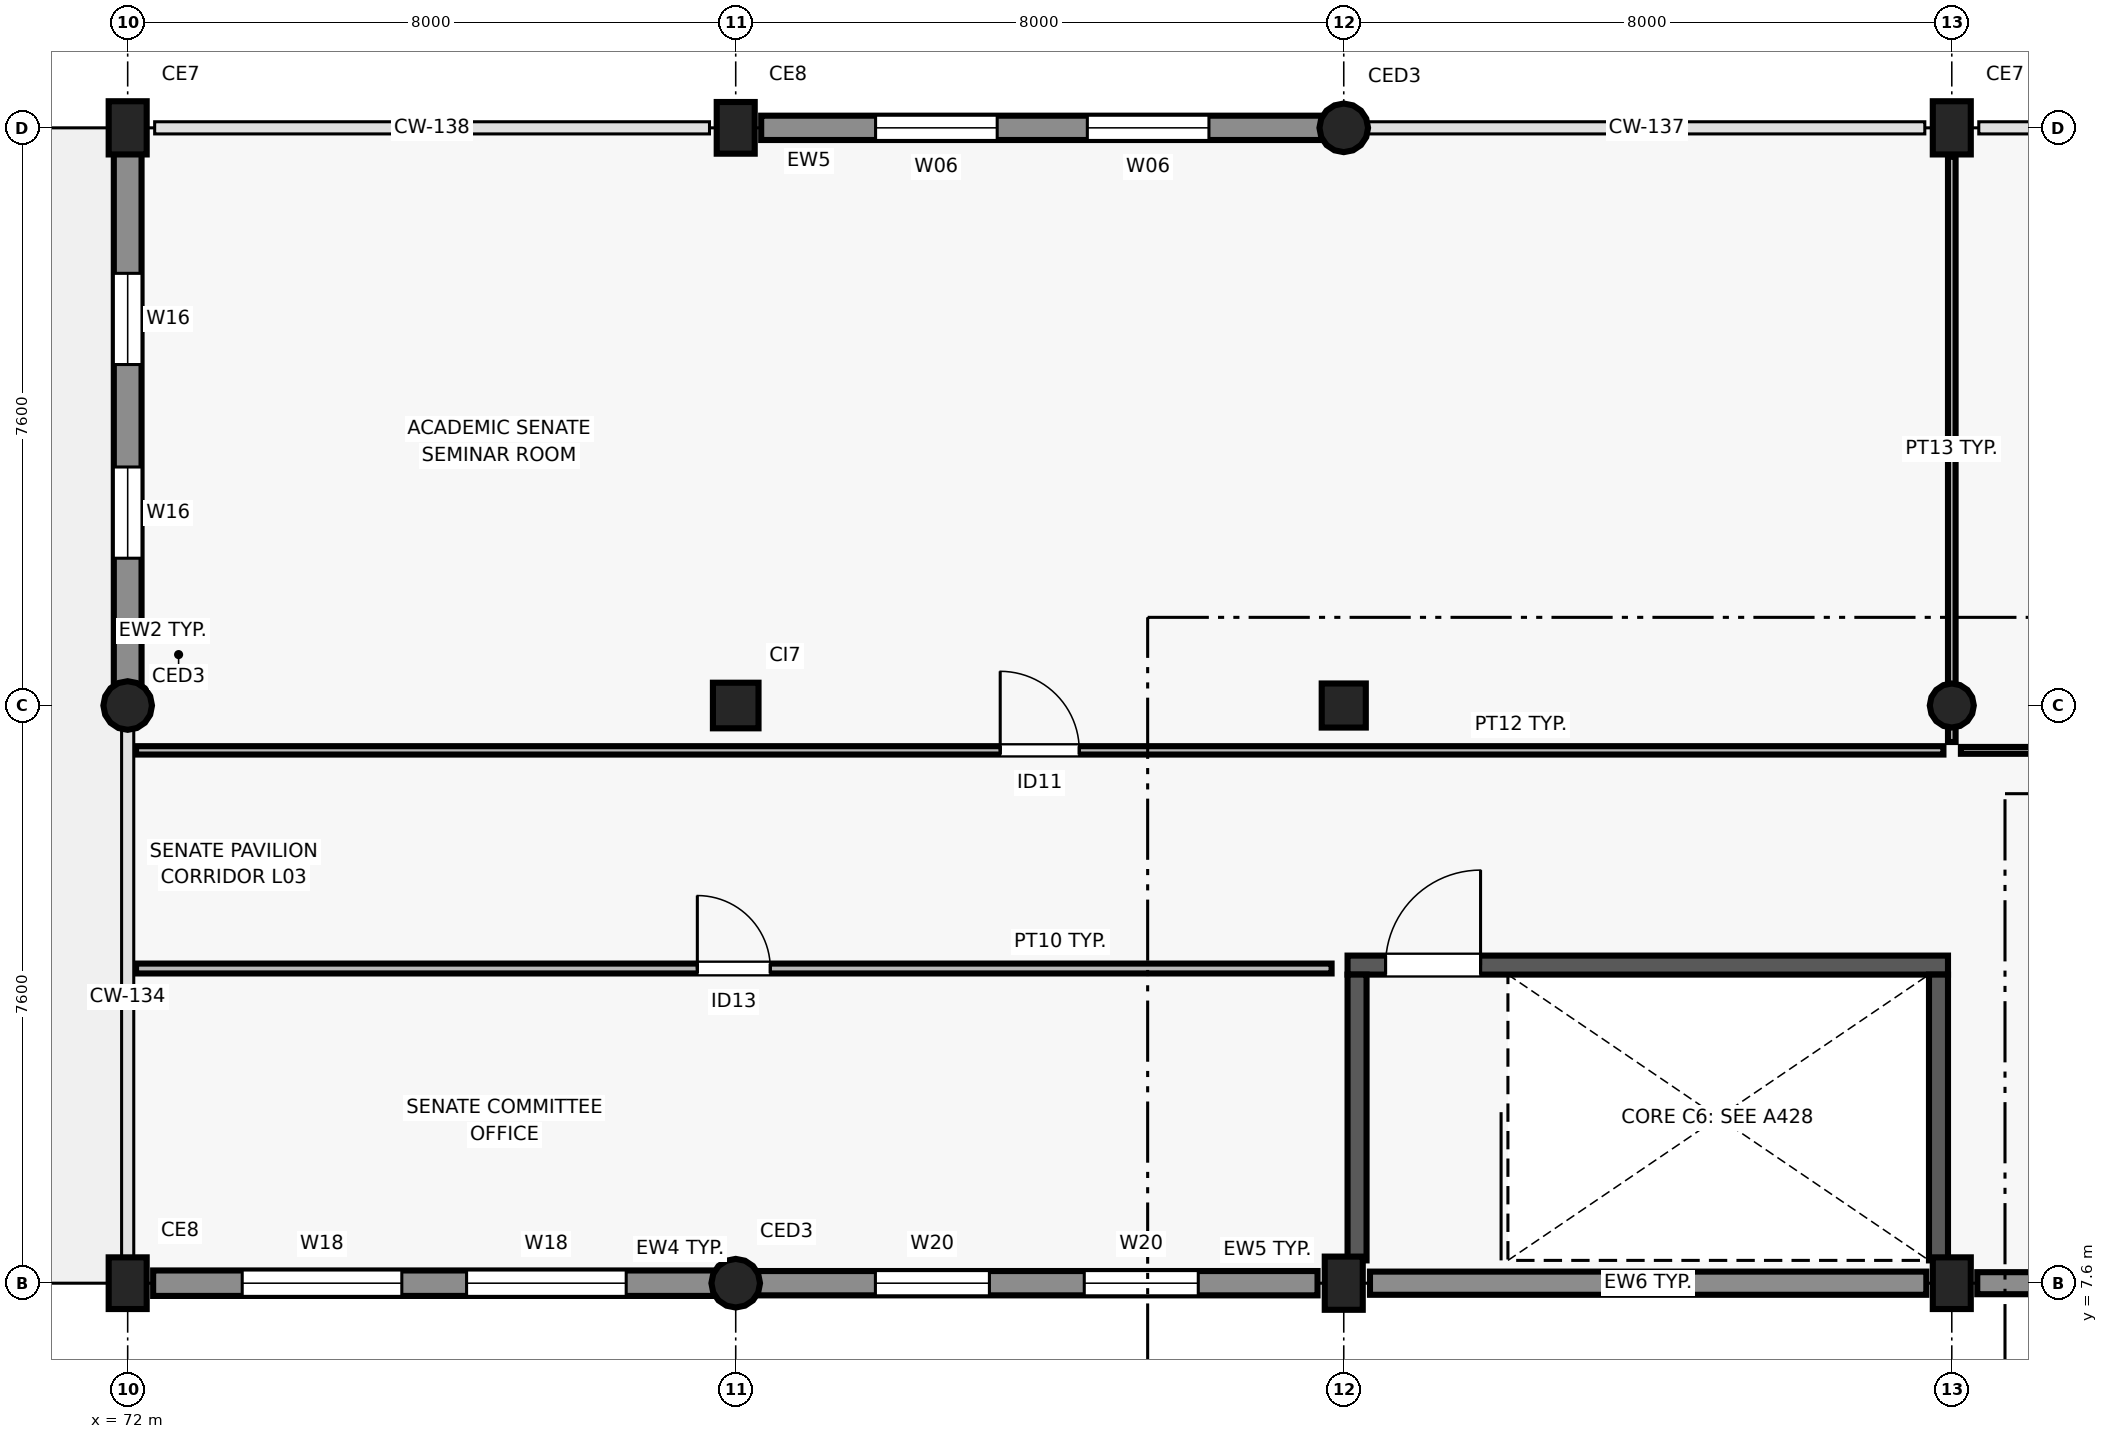
"""IFC4 building model, lengths in metres.
Left out: names, types, materials, properties, quantities, classifications, styles, units other than length and angle.
Written with IfcOpenShell. Run it as: python <this file> out.ifc"""

import sys

from ifc_helpers import new_model, si_unit, direction, frame, frame_2d, origin, origin_2d, place, context, subcontext, project, spatial, rectangle, circle, extrude, element, fill, save


model = new_model("IFC4")
c1 = context("Model", 3, precision=1e-05, world=origin(), true_north=direction((0.0, 1.0)))
c2 = subcontext(c1, "Body", "Model", "MODEL_VIEW")
j1 = project(units=[si_unit("LENGTHUNIT", "METRE"), si_unit("PLANEANGLEUNIT", "RADIAN")], contexts=[c1])
p1 = place(None, origin())
s1 = spatial("IfcSite", under=j1, at=p1, CompositionType="ELEMENT")
p2 = place(p1, origin())
s2 = spatial("IfcBuilding", under=s1, at=p2, CompositionType="ELEMENT")
p3 = place(p2, frame((0.0, 0.0, 13.2)))
s3 = spatial("IfcBuildingStorey", under=s2, at=p3, CompositionType="ELEMENT", Elevation=13.2)
p4 = place(p3, frame((72.0, 7.6, 0.0), z_axis=(0.0, 0.0, 1.0), x_axis=(1.0, 0.0, 0.0)))
e1 = element("IfcColumn", 1, at=p4, inside=s3, PredefinedType="COLUMN", context=c2, shape_type="SweptSolid", body=[
    extrude(rectangle(XDim=0.68, YDim=0.5, at=origin_2d()), origin(), (0.0, 0.0, 1.0), 4.2),
])
p5 = place(p3, frame((72.0, 15.2, 0.0), z_axis=(0.0, 0.0, 1.0), x_axis=(1.0, 0.0, 0.0)))
e2 = element("IfcColumn", 2, at=p5, inside=s3, PredefinedType="COLUMN", context=c2, shape_type="SweptSolid", body=[
    extrude(circle(Radius=0.32, at=origin_2d()), origin(), (0.0, 0.0, 1.0), 4.2),
])
p6 = place(p3, frame((72.0, 22.8, 0.0), z_axis=(0.0, 0.0, 1.0), x_axis=(1.0, 0.0, 0.0)))
e3 = element("IfcColumn", 3, at=p6, inside=s3, PredefinedType="COLUMN", context=c2, shape_type="SweptSolid", body=[
    extrude(rectangle(XDim=0.7, YDim=0.5, at=origin_2d()), origin(), (0.0, 0.0, 1.0), 4.2),
])
p7 = place(p3, frame((80.0, 7.6, 0.0), z_axis=(0.0, 0.0, 1.0), x_axis=(1.0, 0.0, 0.0)))
e4 = element("IfcColumn", 4, at=p7, inside=s3, PredefinedType="COLUMN", context=c2, shape_type="SweptSolid", body=[
    extrude(circle(Radius=0.32, at=origin_2d()), origin(), (0.0, 0.0, 1.0), 4.2),
])
p8 = place(p3, frame((80.0, 15.2, 0.0), z_axis=(0.0, 0.0, 1.0), x_axis=(1.0, 0.0, 0.0)))
e5 = element("IfcColumn", 5, at=p8, inside=s3, PredefinedType="COLUMN", context=c2, shape_type="SweptSolid", body=[
    extrude(rectangle(XDim=0.6, YDim=0.6, at=origin_2d()), origin(), (0.0, 0.0, 1.0), 4.2),
])
p9 = place(p3, frame((80.0, 22.8, 0.0), z_axis=(0.0, 0.0, 1.0), x_axis=(1.0, 0.0, 0.0)))
e6 = element("IfcColumn", 6, at=p9, inside=s3, PredefinedType="COLUMN", context=c2, shape_type="SweptSolid", body=[
    extrude(rectangle(XDim=0.68, YDim=0.5, at=origin_2d()), origin(), (0.0, 0.0, 1.0), 4.2),
])
p10 = place(p3, frame((88.0, 7.6, 0.0), z_axis=(0.0, 0.0, 1.0), x_axis=(1.0, 0.0, 0.0)))
e7 = element("IfcColumn", 7, at=p10, inside=s3, PredefinedType="COLUMN", context=c2, shape_type="SweptSolid", body=[
    extrude(rectangle(XDim=0.7, YDim=0.5, at=origin_2d()), origin(), (0.0, 0.0, 1.0), 4.2),
])
p11 = place(p3, frame((88.0, 15.2, 0.0), z_axis=(0.0, 0.0, 1.0), x_axis=(1.0, 0.0, 0.0)))
e8 = element("IfcColumn", 8, at=p11, inside=s3, PredefinedType="COLUMN", context=c2, shape_type="SweptSolid", body=[
    extrude(rectangle(XDim=0.58, YDim=0.58, at=origin_2d()), origin(), (0.0, 0.0, 1.0), 4.2),
])
p12 = place(p3, frame((88.0, 22.8, 0.0), z_axis=(0.0, 0.0, 1.0), x_axis=(1.0, 0.0, 0.0)))
e9 = element("IfcColumn", 9, at=p12, inside=s3, PredefinedType="COLUMN", context=c2, shape_type="SweptSolid", body=[
    extrude(circle(Radius=0.32, at=origin_2d()), origin(), (0.0, 0.0, 1.0), 4.2),
])
p13 = place(p3, frame((96.0, 7.6, 0.0), z_axis=(0.0, 0.0, 1.0), x_axis=(1.0, 0.0, 0.0)))
e10 = element("IfcColumn", 10, at=p13, inside=s3, PredefinedType="COLUMN", context=c2, shape_type="SweptSolid", body=[
    extrude(rectangle(XDim=0.68, YDim=0.5, at=origin_2d()), origin(), (0.0, 0.0, 1.0), 4.2),
])
p14 = place(p3, frame((96.0, 15.2, 0.0), z_axis=(0.0, 0.0, 1.0), x_axis=(1.0, 0.0, 0.0)))
e11 = element("IfcColumn", 11, at=p14, inside=s3, PredefinedType="COLUMN", context=c2, shape_type="SweptSolid", body=[
    extrude(circle(Radius=0.29, at=origin_2d()), origin(), (0.0, 0.0, 1.0), 4.2),
])
p15 = place(p3, frame((96.0, 22.8, 0.0), z_axis=(0.0, 0.0, 1.0), x_axis=(1.0, 0.0, 0.0)))
e12 = element("IfcColumn", 12, at=p15, inside=s3, PredefinedType="COLUMN", context=c2, shape_type="SweptSolid", body=[
    extrude(rectangle(XDim=0.7, YDim=0.5, at=origin_2d()), origin(), (0.0, 0.0, 1.0), 4.2),
])
p16 = place(p3, frame((72.0, 22.555, 0.0), z_axis=(0.0, 0.0, 1.0), x_axis=(0.0, -1.0, 0.0)))
e13 = element("IfcWall", 13, at=p16, inside=s3, PredefinedType="SOLIDWALL", context=c2, shape_type="SweptSolid", body=[
    extrude(rectangle(XDim=7.086, YDim=0.365, at=frame_2d((3.543, 0.0))), origin(), (0.0, 0.0, 1.0), 3.5),
])
p17 = place(p16, frame((1.669, 0.0, 0.9)))
e14 = element("IfcOpeningElement", 14, at=p17, cuts=e13, PredefinedType="OPENING", context=c2, shape_type="SweptSolid", body=[
    extrude(rectangle(XDim=1.2, YDim=1.5, at=frame_2d((0.6, 0.75))), frame((0.0, 0.192, 0.0), z_axis=(0.0, -1.0, 0.0), x_axis=(1.0, 0.0, 0.0)), (0.0, 0.0, 1.0), 0.385),
])
p18 = place(p16, frame((4.217, 0.0, 0.9)))
e15 = element("IfcOpeningElement", 15, at=p18, cuts=e13, PredefinedType="OPENING", context=c2, shape_type="SweptSolid", body=[
    extrude(rectangle(XDim=1.2, YDim=1.5, at=frame_2d((0.6, 0.75))), frame((0.0, 0.192, 0.0), z_axis=(0.0, -1.0, 0.0), x_axis=(1.0, 0.0, 0.0)), (0.0, 0.0, 1.0), 0.385),
])
p19 = place(p3, frame((72.335, 7.6, 0.0), z_axis=(0.0, 0.0, 1.0), x_axis=(1.0, 0.0, 0.0)))
e16 = element("IfcWall", 16, at=p19, inside=s3, PredefinedType="SOLIDWALL", context=c2, shape_type="SweptSolid", body=[
    extrude(rectangle(XDim=7.396, YDim=0.335, at=frame_2d((3.698, 0.0))), origin(), (0.0, 0.0, 1.0), 3.36),
])
p20 = place(p19, frame((1.172, 0.0, 0.9)))
e17 = element("IfcOpeningElement", 17, at=p20, cuts=e16, PredefinedType="OPENING", context=c2, shape_type="SweptSolid", body=[
    extrude(rectangle(XDim=2.1, YDim=1.25, at=frame_2d((1.05, 0.625))), frame((0.0, 0.177, 0.0), z_axis=(0.0, -1.0, 0.0), x_axis=(1.0, 0.0, 0.0)), (0.0, 0.0, 1.0), 0.355),
])
p21 = place(p19, frame((4.124, 0.0, 0.9)))
e18 = element("IfcOpeningElement", 18, at=p21, cuts=e16, PredefinedType="OPENING", context=c2, shape_type="SweptSolid", body=[
    extrude(rectangle(XDim=2.1, YDim=1.25, at=frame_2d((1.05, 0.625))), frame((0.0, 0.177, 0.0), z_axis=(0.0, -1.0, 0.0), x_axis=(1.0, 0.0, 0.0)), (0.0, 0.0, 1.0), 0.355),
])
p22 = place(p3, frame((80.269, 7.6, 0.0), z_axis=(0.0, 0.0, 1.0), x_axis=(1.0, 0.0, 0.0)))
e19 = element("IfcWall", 19, at=p22, inside=s3, PredefinedType="SOLIDWALL", context=c2, shape_type="SweptSolid", body=[
    extrude(rectangle(XDim=7.386, YDim=0.32, at=frame_2d((3.693, 0.0))), origin(), (0.0, 0.0, 1.0), 3.28),
])
p23 = place(p22, frame((1.569, 0.0, 0.9)))
e20 = element("IfcOpeningElement", 20, at=p23, cuts=e19, PredefinedType="OPENING", context=c2, shape_type="SweptSolid", body=[
    extrude(rectangle(XDim=1.5, YDim=1.25, at=frame_2d((0.75, 0.625))), frame((0.0, 0.17, 0.0), z_axis=(0.0, -1.0, 0.0), x_axis=(1.0, 0.0, 0.0)), (0.0, 0.0, 1.0), 0.34),
])
p24 = place(p22, frame((4.317, 0.0, 0.9)))
e21 = element("IfcOpeningElement", 21, at=p24, cuts=e19, PredefinedType="OPENING", context=c2, shape_type="SweptSolid", body=[
    extrude(rectangle(XDim=1.5, YDim=1.25, at=frame_2d((0.75, 0.625))), frame((0.0, 0.17, 0.0), z_axis=(0.0, -1.0, 0.0), x_axis=(1.0, 0.0, 0.0)), (0.0, 0.0, 1.0), 0.34),
])
p25 = place(p3, frame((88.345, 7.6, 0.0), z_axis=(0.0, 0.0, 1.0), x_axis=(1.0, 0.0, 0.0)))
e22 = element("IfcWall", 22, at=p25, inside=s3, PredefinedType="SOLIDWALL", context=c2, shape_type="SweptSolid", body=[
    extrude(rectangle(XDim=7.32, YDim=0.305, at=frame_2d((3.66, 0.0))), origin(), (0.0, 0.0, 1.0), 3.92),
])
p26 = place(p3, frame((96.335, 7.6, 0.0), z_axis=(0.0, 0.0, 1.0), x_axis=(1.0, 0.0, 0.0)))
e23 = element("IfcWall", 23, at=p26, inside=s3, PredefinedType="SOLIDWALL", context=c2, shape_type="SweptSolid", body=[
    extrude(rectangle(XDim=7.396, YDim=0.29, at=frame_2d((3.698, 0.0))), origin(), (0.0, 0.0, 1.0), 3.92),
])
p27 = place(p26, frame((0.858, 0.0, 0.9)))
e24 = element("IfcOpeningElement", 24, at=p27, cuts=e23, PredefinedType="OPENING", context=c2, shape_type="SweptSolid", body=[
    extrude(rectangle(XDim=0.95, YDim=1.25, at=frame_2d((0.475, 0.625))), frame((0.0, 0.155, 0.0), z_axis=(0.0, -1.0, 0.0), x_axis=(1.0, 0.0, 0.0)), (0.0, 0.0, 1.0), 0.31),
])
p28 = place(p26, frame((3.531, 0.0, 0.9)))
e25 = element("IfcOpeningElement", 25, at=p28, cuts=e23, PredefinedType="OPENING", context=c2, shape_type="SweptSolid", body=[
    extrude(rectangle(XDim=3.0, YDim=1.65, at=frame_2d((1.5, 0.825))), frame((0.0, 0.155, 0.0), z_axis=(0.0, -1.0, 0.0), x_axis=(1.0, 0.0, 0.0)), (0.0, 0.0, 1.0), 0.31),
])
p29 = place(p3, frame((87.731, 22.8, 0.0), z_axis=(0.0, 0.0, 1.0), x_axis=(-1.0, 0.0, 0.0)))
e26 = element("IfcWall", 26, at=p29, inside=s3, PredefinedType="SOLIDWALL", context=c2, shape_type="SweptSolid", body=[
    extrude(rectangle(XDim=7.396, YDim=0.32, at=frame_2d((3.698, 0.0))), origin(), (0.0, 0.0, 1.0), 3.36),
])
p30 = place(p29, frame((1.505, 0.0, 0.9)))
e27 = element("IfcOpeningElement", 27, at=p30, cuts=e26, PredefinedType="OPENING", context=c2, shape_type="SweptSolid", body=[
    extrude(rectangle(XDim=1.6, YDim=1.8, at=frame_2d((0.8, 0.9))), frame((0.0, 0.17, 0.0), z_axis=(0.0, -1.0, 0.0), x_axis=(1.0, 0.0, 0.0)), (0.0, 0.0, 1.0), 0.34),
])
p31 = place(p29, frame((4.291, 0.0, 0.9)))
e28 = element("IfcOpeningElement", 28, at=p31, cuts=e26, PredefinedType="OPENING", context=c2, shape_type="SweptSolid", body=[
    extrude(rectangle(XDim=1.6, YDim=1.8, at=frame_2d((0.8, 0.9))), frame((0.0, 0.17, 0.0), z_axis=(0.0, -1.0, 0.0), x_axis=(1.0, 0.0, 0.0)), (0.0, 0.0, 1.0), 0.34),
])
p32 = place(p3, frame((88.05, 11.785, 0.0), z_axis=(0.0, 0.0, 1.0), x_axis=(1.0, 0.0, 0.0)))
e29 = element("IfcWall", 29, at=p32, inside=s3, PredefinedType="SHEAR", context=c2, shape_type="SweptSolid", body=[
    extrude(rectangle(XDim=7.9, YDim=0.25, at=frame_2d((3.95, 0.0))), origin(), (0.0, 0.0, 1.0), 3.92),
])
p33 = place(p32, frame((0.5, 0.0, 0.0)))
e30 = element("IfcOpeningElement", 30, at=p33, cuts=e29, PredefinedType="OPENING", context=c2, shape_type="SweptSolid", body=[
    extrude(rectangle(XDim=1.25, YDim=2.2, at=frame_2d((0.625, 1.1))), frame((0.0, 0.135, 0.0), z_axis=(0.0, -1.0, 0.0), x_axis=(1.0, 0.0, 0.0)), (0.0, 0.0, 1.0), 0.27),
])
for number, where, z_axis, x_axis in (
    (31, (88.175, 7.9, 0.0), (0.0, 0.0, 1.0), (0.0, 1.0, 0.0)),
    (32, (95.825, 7.9, 0.0), (0.0, 0.0, 1.0), (0.0, 1.0, 0.0)),
):
    element("IfcWall", number, at=place(p3, frame(where, z_axis=z_axis, x_axis=x_axis)), inside=s3, PredefinedType="SHEAR", context=c2, shape_type="SweptSolid", body=[
        extrude(rectangle(XDim=3.76, YDim=0.25, at=frame_2d((1.88, 0.0))), origin(), (0.0, 0.0, 1.0), 3.92),
    ])
p34 = place(p3, frame((72.11, 11.74, 0.0), z_axis=(0.0, 0.0, 1.0), x_axis=(1.0, 0.0, 0.0)))
e33 = element("IfcWall", 33, at=p34, inside=s3, PredefinedType="PARTITIONING", context=c2, shape_type="SweptSolid", body=[
    extrude(rectangle(XDim=15.73, YDim=0.13, at=frame_2d((7.865, 0.0))), origin(), (0.0, 0.0, 1.0), 3.9),
])
p35 = place(p34, frame((7.385, 0.0, 0.0)))
e34 = element("IfcOpeningElement", 34, at=p35, cuts=e33, PredefinedType="OPENING", context=c2, shape_type="SweptSolid", body=[
    extrude(rectangle(XDim=0.96, YDim=2.15, at=frame_2d((0.48, 1.075))), frame((0.0, 0.075, 0.0), z_axis=(0.0, -1.0, 0.0), x_axis=(1.0, 0.0, 0.0)), (0.0, 0.0, 1.0), 0.15),
])
p36 = place(p3, frame((72.11, 14.61, 0.0), z_axis=(0.0, 0.0, 1.0), x_axis=(1.0, 0.0, 0.0)))
e35 = element("IfcWall", 35, at=p36, inside=s3, PredefinedType="PARTITIONING", context=c2, shape_type="SweptSolid", body=[
    extrude(rectangle(XDim=23.78, YDim=0.11, at=frame_2d((11.89, 0.0))), origin(), (0.0, 0.0, 1.0), 3.9),
])
p37 = place(p36, frame((11.37, 0.0, 0.0)))
e36 = element("IfcOpeningElement", 36, at=p37, cuts=e35, PredefinedType="OPENING", context=c2, shape_type="SweptSolid", body=[
    extrude(rectangle(XDim=1.04, YDim=2.15, at=frame_2d((0.52, 1.075))), frame((0.0, 0.065, 0.0), z_axis=(0.0, -1.0, 0.0), x_axis=(1.0, 0.0, 0.0)), (0.0, 0.0, 1.0), 0.13),
])
p38 = place(p3, frame((96.0, 14.72, 0.0), z_axis=(0.0, 0.0, 1.0), x_axis=(0.0, 1.0, 0.0)))
e37 = element("IfcWall", 37, at=p38, inside=s3, PredefinedType="PARTITIONING", context=c2, shape_type="SweptSolid", body=[
    extrude(rectangle(XDim=7.7, YDim=0.1, at=frame_2d((3.85, 0.0))), origin(), (0.0, 0.0, 1.0), 3.38),
])
p39 = place(p3, frame((96.12, 14.61, 0.0), z_axis=(0.0, 0.0, 1.0), x_axis=(1.0, 0.0, 0.0)))
e38 = element("IfcWall", 38, at=p39, inside=s3, PredefinedType="PARTITIONING", context=c2, shape_type="SweptSolid", body=[
    extrude(rectangle(XDim=15.77, YDim=0.09, at=frame_2d((7.885, 0.0))), origin(), (0.0, 0.0, 1.0), 3.9),
])
p40 = place(p39, frame((4.862, 0.0, 0.0)))
e39 = element("IfcOpeningElement", 39, at=p40, cuts=e38, PredefinedType="OPENING", context=c2, shape_type="SweptSolid", body=[
    extrude(rectangle(XDim=1.0, YDim=2.15, at=frame_2d((0.5, 1.075))), frame((0.0, 0.055, 0.0), z_axis=(0.0, -1.0, 0.0), x_axis=(1.0, 0.0, 0.0)), (0.0, 0.0, 1.0), 0.11),
])
p41 = place(p17, origin())
e40 = element("IfcWindow", 40, at=p41, inside=s3, PartitioningType="SINGLE_PANEL", PredefinedType="WINDOW", context=c2, shape_type="SweptSolid", body=[
    extrude(rectangle(XDim=1.2, YDim=1.5, at=frame_2d((0.6, 0.75))), frame((0.0, 0.03, 0.0), z_axis=(0.0, -1.0, 0.0), x_axis=(1.0, 0.0, 0.0)), (0.0, 0.0, 1.0), 0.06),
])
fill(e14, e40)
p42 = place(p18, origin())
e41 = element("IfcWindow", 41, at=p42, inside=s3, PartitioningType="SINGLE_PANEL", PredefinedType="WINDOW", context=c2, shape_type="SweptSolid", body=[
    extrude(rectangle(XDim=1.2, YDim=1.5, at=frame_2d((0.6, 0.75))), frame((0.0, 0.03, 0.0), z_axis=(0.0, -1.0, 0.0), x_axis=(1.0, 0.0, 0.0)), (0.0, 0.0, 1.0), 0.06),
])
fill(e15, e41)
p43 = place(p20, origin())
e42 = element("IfcWindow", 42, at=p43, inside=s3, PartitioningType="SINGLE_PANEL", PredefinedType="WINDOW", context=c2, shape_type="SweptSolid", body=[
    extrude(rectangle(XDim=2.1, YDim=1.25, at=frame_2d((1.05, 0.625))), frame((0.0, 0.03, 0.0), z_axis=(0.0, -1.0, 0.0), x_axis=(1.0, 0.0, 0.0)), (0.0, 0.0, 1.0), 0.06),
])
fill(e17, e42)
p44 = place(p21, origin())
e43 = element("IfcWindow", 43, at=p44, inside=s3, PartitioningType="SINGLE_PANEL", PredefinedType="WINDOW", context=c2, shape_type="SweptSolid", body=[
    extrude(rectangle(XDim=2.1, YDim=1.25, at=frame_2d((1.05, 0.625))), frame((0.0, 0.03, 0.0), z_axis=(0.0, -1.0, 0.0), x_axis=(1.0, 0.0, 0.0)), (0.0, 0.0, 1.0), 0.06),
])
fill(e18, e43)
p45 = place(p23, origin())
e44 = element("IfcWindow", 44, at=p45, inside=s3, PartitioningType="SINGLE_PANEL", PredefinedType="WINDOW", context=c2, shape_type="SweptSolid", body=[
    extrude(rectangle(XDim=1.5, YDim=1.25, at=frame_2d((0.75, 0.625))), frame((0.0, 0.03, 0.0), z_axis=(0.0, -1.0, 0.0), x_axis=(1.0, 0.0, 0.0)), (0.0, 0.0, 1.0), 0.06),
])
fill(e20, e44)
p46 = place(p24, origin())
e45 = element("IfcWindow", 45, at=p46, inside=s3, PartitioningType="SINGLE_PANEL", PredefinedType="WINDOW", context=c2, shape_type="SweptSolid", body=[
    extrude(rectangle(XDim=1.5, YDim=1.25, at=frame_2d((0.75, 0.625))), frame((0.0, 0.03, 0.0), z_axis=(0.0, -1.0, 0.0), x_axis=(1.0, 0.0, 0.0)), (0.0, 0.0, 1.0), 0.06),
])
fill(e21, e45)
p47 = place(p30, origin())
e46 = element("IfcWindow", 46, at=p47, inside=s3, PartitioningType="SINGLE_PANEL", PredefinedType="WINDOW", context=c2, shape_type="SweptSolid", body=[
    extrude(rectangle(XDim=1.6, YDim=1.8, at=frame_2d((0.8, 0.9))), frame((0.0, 0.03, 0.0), z_axis=(0.0, -1.0, 0.0), x_axis=(1.0, 0.0, 0.0)), (0.0, 0.0, 1.0), 0.06),
])
fill(e27, e46)
p48 = place(p31, origin())
e47 = element("IfcWindow", 47, at=p48, inside=s3, PartitioningType="SINGLE_PANEL", PredefinedType="WINDOW", context=c2, shape_type="SweptSolid", body=[
    extrude(rectangle(XDim=1.6, YDim=1.8, at=frame_2d((0.8, 0.9))), frame((0.0, 0.03, 0.0), z_axis=(0.0, -1.0, 0.0), x_axis=(1.0, 0.0, 0.0)), (0.0, 0.0, 1.0), 0.06),
])
fill(e28, e47)
p49 = place(p33, origin())
e48 = element("IfcDoor", 48, at=p49, inside=s3, OperationType="SINGLE_SWING_RIGHT", PredefinedType="DOOR", context=c2, shape_type="SweptSolid", body=[
    extrude(rectangle(XDim=1.25, YDim=2.2, at=frame_2d((0.625, 1.1))), frame((0.0, 0.025, 0.0), z_axis=(0.0, -1.0, 0.0), x_axis=(1.0, 0.0, 0.0)), (0.0, 0.0, 1.0), 0.05),
])
fill(e30, e48)
p50 = place(p35, origin())
e49 = element("IfcDoor", 49, at=p50, inside=s3, OperationType="SINGLE_SWING_LEFT", PredefinedType="DOOR", context=c2, shape_type="SweptSolid", body=[
    extrude(rectangle(XDim=0.96, YDim=2.15, at=frame_2d((0.48, 1.075))), frame((0.0, 0.025, 0.0), z_axis=(0.0, -1.0, 0.0), x_axis=(1.0, 0.0, 0.0)), (0.0, 0.0, 1.0), 0.05),
])
fill(e34, e49)
p51 = place(p37, origin())
e50 = element("IfcDoor", 50, at=p51, inside=s3, OperationType="SINGLE_SWING_LEFT", PredefinedType="DOOR", context=c2, shape_type="SweptSolid", body=[
    extrude(rectangle(XDim=1.04, YDim=2.15, at=frame_2d((0.52, 1.075))), frame((0.0, 0.025, 0.0), z_axis=(0.0, -1.0, 0.0), x_axis=(1.0, 0.0, 0.0)), (0.0, 0.0, 1.0), 0.05),
])
fill(e36, e50)
save(model, sys.argv[1])
